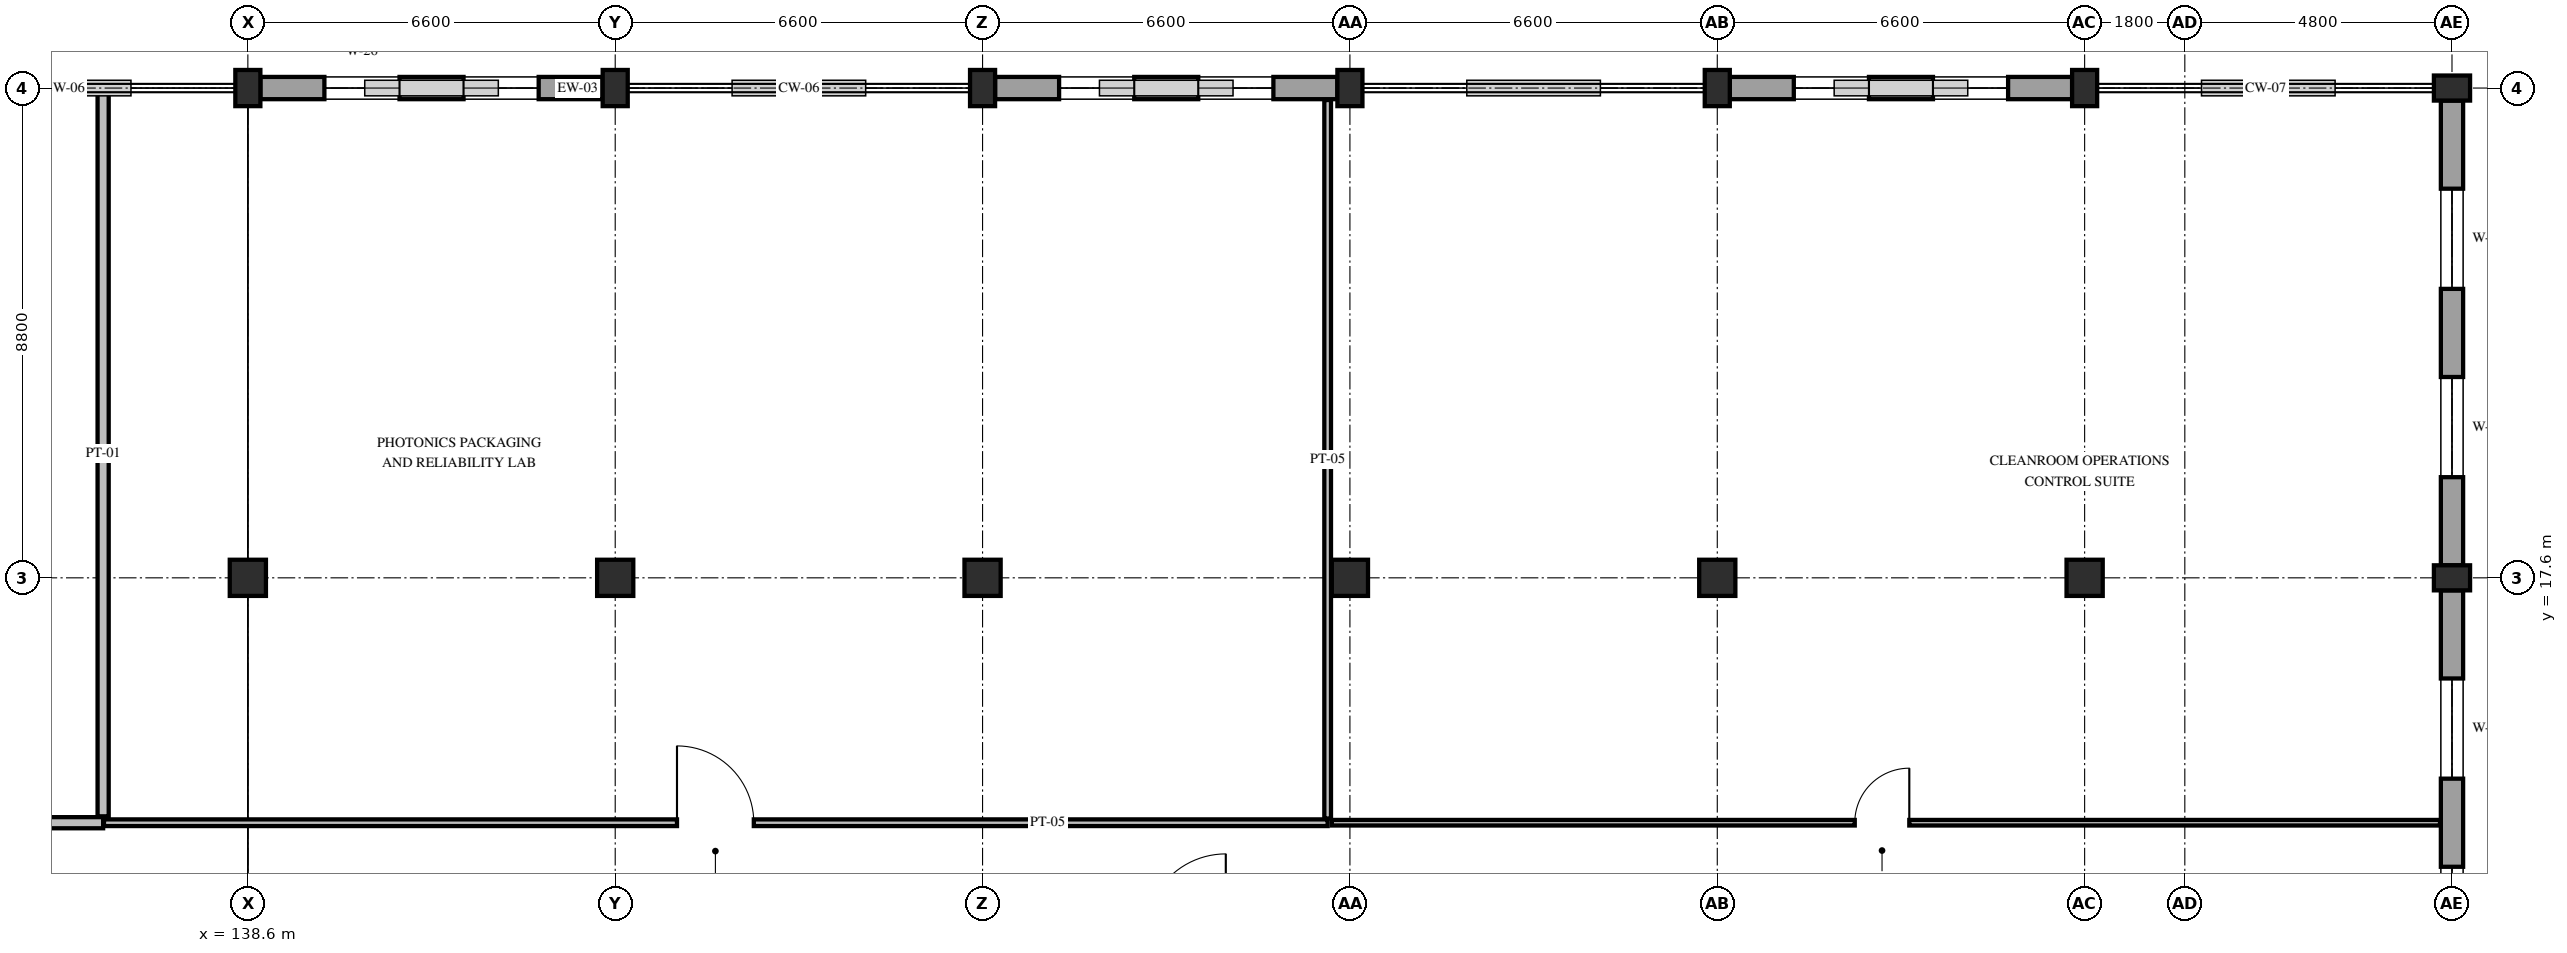
"""IFC4 building model, lengths in metres.
Left out: names, types, materials, properties, quantities, classifications, styles, units other than length and angle.
Written with IfcOpenShell. Run it as: python <this file> out.ifc"""

import sys

from ifc_helpers import new_model, si_unit, direction, frame, frame_2d, origin, origin_2d, place, context, subcontext, project, spatial, rectangle, extrude, element, fill, save


model = new_model("IFC4")
c1 = context("Model", 3, precision=1e-05, world=origin(), true_north=direction((0.0, 1.0)))
c2 = subcontext(c1, "Body", "Model", "MODEL_VIEW")
j1 = project(units=[si_unit("LENGTHUNIT", "METRE"), si_unit("PLANEANGLEUNIT", "RADIAN")], contexts=[c1])
p1 = place(None, origin())
s1 = spatial("IfcSite", under=j1, at=p1, CompositionType="ELEMENT")
p2 = place(p1, origin())
s2 = spatial("IfcBuilding", under=s1, at=p2, CompositionType="ELEMENT")
p3 = place(p2, frame((0.0, 0.0, 15.0)))
s3 = spatial("IfcBuildingStorey", under=s2, at=p3, CompositionType="ELEMENT", Elevation=15.0)
p4 = place(p3, frame((138.6, 17.6, 0.0), z_axis=(0.0, 0.0, 1.0), x_axis=(1.0, 0.0, 0.0)))
e1 = element("IfcColumn", 1, at=p4, inside=s3, PredefinedType="COLUMN", context=c2, shape_type="SweptSolid", body=[
    extrude(rectangle(XDim=0.65, YDim=0.65, at=origin_2d()), origin(), (0.0, 0.0, 1.0), 4.8),
])
p5 = place(p3, frame((138.6, 26.4, 0.0), z_axis=(0.0, 0.0, 1.0), x_axis=(1.0, 0.0, 0.0)))
e2 = element("IfcColumn", 2, at=p5, inside=s3, PredefinedType="PILASTER", context=c2, shape_type="SweptSolid", body=[
    extrude(rectangle(XDim=0.45, YDim=0.65, at=origin_2d()), origin(), (0.0, 0.0, 1.0), 4.8),
])
p6 = place(p3, frame((145.2, 17.6, 0.0), z_axis=(0.0, 0.0, 1.0), x_axis=(1.0, 0.0, 0.0)))
e3 = element("IfcColumn", 3, at=p6, inside=s3, PredefinedType="COLUMN", context=c2, shape_type="SweptSolid", body=[
    extrude(rectangle(XDim=0.65, YDim=0.65, at=origin_2d()), origin(), (0.0, 0.0, 1.0), 4.8),
])
p7 = place(p3, frame((145.2, 26.4, 0.0), z_axis=(0.0, 0.0, 1.0), x_axis=(1.0, 0.0, 0.0)))
e4 = element("IfcColumn", 4, at=p7, inside=s3, PredefinedType="PILASTER", context=c2, shape_type="SweptSolid", body=[
    extrude(rectangle(XDim=0.45, YDim=0.65, at=origin_2d()), origin(), (0.0, 0.0, 1.0), 4.8),
])
p8 = place(p3, frame((151.8, 17.6, 0.0), z_axis=(0.0, 0.0, 1.0), x_axis=(1.0, 0.0, 0.0)))
e5 = element("IfcColumn", 5, at=p8, inside=s3, PredefinedType="COLUMN", context=c2, shape_type="SweptSolid", body=[
    extrude(rectangle(XDim=0.65, YDim=0.65, at=origin_2d()), origin(), (0.0, 0.0, 1.0), 4.8),
])
p9 = place(p3, frame((151.8, 26.4, 0.0), z_axis=(0.0, 0.0, 1.0), x_axis=(1.0, 0.0, 0.0)))
e6 = element("IfcColumn", 6, at=p9, inside=s3, PredefinedType="PILASTER", context=c2, shape_type="SweptSolid", body=[
    extrude(rectangle(XDim=0.45, YDim=0.65, at=origin_2d()), origin(), (0.0, 0.0, 1.0), 4.8),
])
p10 = place(p3, frame((158.4, 17.6, 0.0), z_axis=(0.0, 0.0, 1.0), x_axis=(1.0, 0.0, 0.0)))
e7 = element("IfcColumn", 7, at=p10, inside=s3, PredefinedType="COLUMN", context=c2, shape_type="SweptSolid", body=[
    extrude(rectangle(XDim=0.65, YDim=0.65, at=origin_2d()), origin(), (0.0, 0.0, 1.0), 4.8),
])
p11 = place(p3, frame((158.4, 26.4, 0.0), z_axis=(0.0, 0.0, 1.0), x_axis=(1.0, 0.0, 0.0)))
e8 = element("IfcColumn", 8, at=p11, inside=s3, PredefinedType="PILASTER", context=c2, shape_type="SweptSolid", body=[
    extrude(rectangle(XDim=0.45, YDim=0.65, at=origin_2d()), origin(), (0.0, 0.0, 1.0), 4.8),
])
p12 = place(p3, frame((165.0, 17.6, 0.0), z_axis=(0.0, 0.0, 1.0), x_axis=(1.0, 0.0, 0.0)))
e9 = element("IfcColumn", 9, at=p12, inside=s3, PredefinedType="COLUMN", context=c2, shape_type="SweptSolid", body=[
    extrude(rectangle(XDim=0.65, YDim=0.65, at=origin_2d()), origin(), (0.0, 0.0, 1.0), 4.8),
])
p13 = place(p3, frame((165.0, 26.4, 0.0), z_axis=(0.0, 0.0, 1.0), x_axis=(1.0, 0.0, 0.0)))
e10 = element("IfcColumn", 10, at=p13, inside=s3, PredefinedType="PILASTER", context=c2, shape_type="SweptSolid", body=[
    extrude(rectangle(XDim=0.45, YDim=0.65, at=origin_2d()), origin(), (0.0, 0.0, 1.0), 4.8),
])
p14 = place(p3, frame((171.6, 17.6, 0.0), z_axis=(0.0, 0.0, 1.0), x_axis=(1.0, 0.0, 0.0)))
e11 = element("IfcColumn", 11, at=p14, inside=s3, PredefinedType="COLUMN", context=c2, shape_type="SweptSolid", body=[
    extrude(rectangle(XDim=0.65, YDim=0.65, at=origin_2d()), origin(), (0.0, 0.0, 1.0), 4.8),
])
for number, where, z_axis, x_axis in (
    (12, (171.6, 26.4, 0.0), (0.0, 0.0, 1.0), (1.0, 0.0, 0.0)),
    (13, (178.2, 17.6, 0.0), (0.0, 0.0, 1.0), (0.0, 1.0, 0.0)),
    (14, (178.2, 26.4, 0.0), (0.0, 0.0, 1.0), (0.0, 1.0, 0.0)),
):
    element("IfcColumn", number, at=place(p3, frame(where, z_axis=z_axis, x_axis=x_axis)), inside=s3, PredefinedType="PILASTER", context=c2, shape_type="SweptSolid", body=[
        extrude(rectangle(XDim=0.45, YDim=0.65, at=origin_2d()), origin(), (0.0, 0.0, 1.0), 4.8),
    ])
p15 = place(p3, frame((138.825, 26.4, 0.0), z_axis=(0.0, 0.0, 1.0), x_axis=(1.0, 0.0, 0.0)))
e15 = element("IfcWall", 15, at=p15, inside=s3, PredefinedType="STANDARD", context=c2, shape_type="SweptSolid", body=[
    extrude(rectangle(XDim=6.15, YDim=0.4, at=frame_2d((3.075, 0.0))), origin(), (0.0, 0.0, 1.0), 3.98),
])
p16 = place(p15, frame((1.15, 0.0, 0.85)))
e16 = element("IfcOpeningElement", 16, at=p16, cuts=e15, PredefinedType="OPENING", context=c2, shape_type="SweptSolid", body=[
    extrude(rectangle(XDim=1.35, YDim=1.88, at=frame_2d((0.675, 0.94))), frame((0.0, 0.215, 0.0), z_axis=(0.0, -1.0, 0.0), x_axis=(1.0, 0.0, 0.0)), (0.0, 0.0, 1.0), 0.43),
])
p17 = place(p15, frame((3.65, 0.0, 0.85)))
e17 = element("IfcOpeningElement", 17, at=p17, cuts=e15, PredefinedType="OPENING", context=c2, shape_type="SweptSolid", body=[
    extrude(rectangle(XDim=1.35, YDim=1.88, at=frame_2d((0.675, 0.94))), frame((0.0, 0.215, 0.0), z_axis=(0.0, -1.0, 0.0), x_axis=(1.0, 0.0, 0.0)), (0.0, 0.0, 1.0), 0.43),
])
p18 = place(p3, frame((152.025, 26.4, 0.0), z_axis=(0.0, 0.0, 1.0), x_axis=(1.0, 0.0, 0.0)))
e18 = element("IfcWall", 18, at=p18, inside=s3, PredefinedType="STANDARD", context=c2, shape_type="SweptSolid", body=[
    extrude(rectangle(XDim=6.15, YDim=0.4, at=frame_2d((3.075, 0.0))), origin(), (0.0, 0.0, 1.0), 3.98),
])
p19 = place(p18, frame((1.15, 0.0, 0.85)))
e19 = element("IfcOpeningElement", 19, at=p19, cuts=e18, PredefinedType="OPENING", context=c2, shape_type="SweptSolid", body=[
    extrude(rectangle(XDim=1.35, YDim=1.88, at=frame_2d((0.675, 0.94))), frame((0.0, 0.215, 0.0), z_axis=(0.0, -1.0, 0.0), x_axis=(1.0, 0.0, 0.0)), (0.0, 0.0, 1.0), 0.43),
])
p20 = place(p18, frame((3.65, 0.0, 0.85)))
e20 = element("IfcOpeningElement", 20, at=p20, cuts=e18, PredefinedType="OPENING", context=c2, shape_type="SweptSolid", body=[
    extrude(rectangle(XDim=1.35, YDim=1.88, at=frame_2d((0.675, 0.94))), frame((0.0, 0.215, 0.0), z_axis=(0.0, -1.0, 0.0), x_axis=(1.0, 0.0, 0.0)), (0.0, 0.0, 1.0), 0.43),
])
p21 = place(p3, frame((165.225, 26.4, 0.0), z_axis=(0.0, 0.0, 1.0), x_axis=(1.0, 0.0, 0.0)))
e21 = element("IfcWall", 21, at=p21, inside=s3, PredefinedType="STANDARD", context=c2, shape_type="SweptSolid", body=[
    extrude(rectangle(XDim=6.15, YDim=0.4, at=frame_2d((3.075, 0.0))), origin(), (0.0, 0.0, 1.0), 3.98),
])
p22 = place(p21, frame((1.15, 0.0, 0.85)))
e22 = element("IfcOpeningElement", 22, at=p22, cuts=e21, PredefinedType="OPENING", context=c2, shape_type="SweptSolid", body=[
    extrude(rectangle(XDim=1.35, YDim=1.88, at=frame_2d((0.675, 0.94))), frame((0.0, 0.215, 0.0), z_axis=(0.0, -1.0, 0.0), x_axis=(1.0, 0.0, 0.0)), (0.0, 0.0, 1.0), 0.43),
])
p23 = place(p21, frame((3.65, 0.0, 0.85)))
e23 = element("IfcOpeningElement", 23, at=p23, cuts=e21, PredefinedType="OPENING", context=c2, shape_type="SweptSolid", body=[
    extrude(rectangle(XDim=1.35, YDim=1.88, at=frame_2d((0.675, 0.94))), frame((0.0, 0.215, 0.0), z_axis=(0.0, -1.0, 0.0), x_axis=(1.0, 0.0, 0.0)), (0.0, 0.0, 1.0), 0.43),
])
p24 = place(p3, frame((178.2, 26.175, 0.0), z_axis=(0.0, 0.0, 1.0), x_axis=(0.0, -1.0, 0.0)))
e24 = element("IfcWall", 24, at=p24, inside=s3, PredefinedType="STANDARD", context=c2, shape_type="SweptSolid", body=[
    extrude(rectangle(XDim=8.35, YDim=0.4, at=frame_2d((4.175, 0.0))), origin(), (0.0, 0.0, 1.0), 3.98),
])
p25 = place(p24, frame((1.583, 0.0, 0.85)))
e25 = element("IfcOpeningElement", 25, at=p25, cuts=e24, PredefinedType="OPENING", context=c2, shape_type="SweptSolid", body=[
    extrude(rectangle(XDim=1.8, YDim=2.04, at=frame_2d((0.9, 1.02))), frame((0.0, 0.215, 0.0), z_axis=(0.0, -1.0, 0.0), x_axis=(1.0, 0.0, 0.0)), (0.0, 0.0, 1.0), 0.43),
])
p26 = place(p24, frame((4.967, 0.0, 0.85)))
e26 = element("IfcOpeningElement", 26, at=p26, cuts=e24, PredefinedType="OPENING", context=c2, shape_type="SweptSolid", body=[
    extrude(rectangle(XDim=1.8, YDim=2.04, at=frame_2d((0.9, 1.02))), frame((0.0, 0.215, 0.0), z_axis=(0.0, -1.0, 0.0), x_axis=(1.0, 0.0, 0.0)), (0.0, 0.0, 1.0), 0.43),
])
p27 = place(p3, frame((178.2, 17.375, 0.0), z_axis=(0.0, 0.0, 1.0), x_axis=(0.0, -1.0, 0.0)))
e27 = element("IfcWall", 27, at=p27, inside=s3, PredefinedType="STANDARD", context=c2, shape_type="SweptSolid", body=[
    extrude(rectangle(XDim=8.35, YDim=0.4, at=frame_2d((4.175, 0.0))), origin(), (0.0, 0.0, 1.0), 3.98),
])
p28 = place(p27, frame((1.583, 0.0, 0.85)))
e28 = element("IfcOpeningElement", 28, at=p28, cuts=e27, PredefinedType="OPENING", context=c2, shape_type="SweptSolid", body=[
    extrude(rectangle(XDim=1.8, YDim=2.04, at=frame_2d((0.9, 1.02))), frame((0.0, 0.215, 0.0), z_axis=(0.0, -1.0, 0.0), x_axis=(1.0, 0.0, 0.0)), (0.0, 0.0, 1.0), 0.43),
])
p29 = place(p27, frame((4.967, 0.0, 0.85)))
e29 = element("IfcOpeningElement", 29, at=p29, cuts=e27, PredefinedType="OPENING", context=c2, shape_type="SweptSolid", body=[
    extrude(rectangle(XDim=1.8, YDim=2.04, at=frame_2d((0.9, 1.02))), frame((0.0, 0.215, 0.0), z_axis=(0.0, -1.0, 0.0), x_axis=(1.0, 0.0, 0.0)), (0.0, 0.0, 1.0), 0.43),
])
p30 = place(p3, frame((99.24, 13.2, 0.0), z_axis=(0.0, 0.0, 1.0), x_axis=(1.0, 0.0, 0.0)))
e30 = element("IfcWall", 30, at=p30, inside=s3, PredefinedType="PARTITIONING", context=c2, shape_type="SweptSolid", body=[
    extrude(rectangle(XDim=36.76, YDim=0.2, at=frame_2d((18.38, 0.0))), origin(), (0.0, 0.0, 1.0), 4.065),
])
p31 = place(p30, frame((20.23, 0.0, 0.0)))
e31 = element("IfcOpeningElement", 31, at=p31, cuts=e30, PredefinedType="OPENING", context=c2, shape_type="SweptSolid", body=[
    extrude(rectangle(XDim=1.76, YDim=2.35, at=frame_2d((0.88, 1.175))), frame((0.0, 0.115, 0.0), z_axis=(0.0, -1.0, 0.0), x_axis=(1.0, 0.0, 0.0)), (0.0, 0.0, 1.0), 0.23),
])
p32 = place(p3, frame((136.0, 13.315, 0.0), z_axis=(0.0, 0.0, 1.0), x_axis=(0.0, 1.0, 0.0)))
e32 = element("IfcWall", 32, at=p32, inside=s3, PredefinedType="PARTITIONING", context=c2, shape_type="SweptSolid", body=[
    extrude(rectangle(XDim=13.045, YDim=0.2, at=frame_2d((6.522, 0.0))), origin(), (0.0, 0.0, 1.0), 3.98),
])
p33 = place(p3, frame((136.015, 13.2, 0.0), z_axis=(0.0, 0.0, 1.0), x_axis=(1.0, 0.0, 0.0)))
e33 = element("IfcWall", 33, at=p33, inside=s3, PredefinedType="PARTITIONING", context=c2, shape_type="SweptSolid", body=[
    extrude(rectangle(XDim=21.985, YDim=0.12, at=frame_2d((10.993, 0.0))), origin(), (0.0, 0.0, 1.0), 4.065),
])
p34 = place(p33, frame((10.295, 0.0, 0.0)))
e34 = element("IfcOpeningElement", 34, at=p34, cuts=e33, PredefinedType="OPENING", context=c2, shape_type="SweptSolid", body=[
    extrude(rectangle(XDim=1.38, YDim=2.25, at=frame_2d((0.69, 1.125))), frame((0.0, 0.075, 0.0), z_axis=(0.0, -1.0, 0.0), x_axis=(1.0, 0.0, 0.0)), (0.0, 0.0, 1.0), 0.15),
])
p35 = place(p3, frame((158.0, 13.275, 0.0), z_axis=(0.0, 0.0, 1.0), x_axis=(0.0, 1.0, 0.0)))
e35 = element("IfcWall", 35, at=p35, inside=s3, PredefinedType="PARTITIONING", context=c2, shape_type="SweptSolid", body=[
    extrude(rectangle(XDim=12.91, YDim=0.12, at=frame_2d((6.455, 0.0))), origin(), (0.0, 0.0, 1.0), 3.98),
])
p36 = place(p3, frame((158.075, 13.2, 0.0), z_axis=(0.0, 0.0, 1.0), x_axis=(1.0, 0.0, 0.0)))
e36 = element("IfcWall", 36, at=p36, inside=s3, PredefinedType="PARTITIONING", context=c2, shape_type="SweptSolid", body=[
    extrude(rectangle(XDim=19.91, YDim=0.1, at=frame_2d((9.955, 0.0))), origin(), (0.0, 0.0, 1.0), 3.98),
])
p37 = place(p36, frame((9.395, 0.0, 0.0)))
e37 = element("IfcOpeningElement", 37, at=p37, cuts=e36, PredefinedType="OPENING", context=c2, shape_type="SweptSolid", body=[
    extrude(rectangle(XDim=0.98, YDim=2.2, at=frame_2d((0.49, 1.1))), frame((0.0, 0.065, 0.0), z_axis=(0.0, -1.0, 0.0), x_axis=(1.0, 0.0, 0.0)), (0.0, 0.0, 1.0), 0.13),
])
p38 = place(p16, origin())
e38 = element("IfcWindow", 38, at=p38, inside=s3, PartitioningType="SINGLE_PANEL", PredefinedType="WINDOW", context=c2, shape_type="SweptSolid", body=[
    extrude(rectangle(XDim=1.35, YDim=1.88, at=frame_2d((0.675, 0.94))), frame((0.0, 0.03, 0.0), z_axis=(0.0, -1.0, 0.0), x_axis=(1.0, 0.0, 0.0)), (0.0, 0.0, 1.0), 0.06),
])
fill(e16, e38)
p39 = place(p17, origin())
e39 = element("IfcWindow", 39, at=p39, inside=s3, PartitioningType="SINGLE_PANEL", PredefinedType="WINDOW", context=c2, shape_type="SweptSolid", body=[
    extrude(rectangle(XDim=1.35, YDim=1.88, at=frame_2d((0.675, 0.94))), frame((0.0, 0.03, 0.0), z_axis=(0.0, -1.0, 0.0), x_axis=(1.0, 0.0, 0.0)), (0.0, 0.0, 1.0), 0.06),
])
fill(e17, e39)
p40 = place(p19, origin())
e40 = element("IfcWindow", 40, at=p40, inside=s3, PartitioningType="SINGLE_PANEL", PredefinedType="WINDOW", context=c2, shape_type="SweptSolid", body=[
    extrude(rectangle(XDim=1.35, YDim=1.88, at=frame_2d((0.675, 0.94))), frame((0.0, 0.03, 0.0), z_axis=(0.0, -1.0, 0.0), x_axis=(1.0, 0.0, 0.0)), (0.0, 0.0, 1.0), 0.06),
])
fill(e19, e40)
p41 = place(p20, origin())
e41 = element("IfcWindow", 41, at=p41, inside=s3, PartitioningType="SINGLE_PANEL", PredefinedType="WINDOW", context=c2, shape_type="SweptSolid", body=[
    extrude(rectangle(XDim=1.35, YDim=1.88, at=frame_2d((0.675, 0.94))), frame((0.0, 0.03, 0.0), z_axis=(0.0, -1.0, 0.0), x_axis=(1.0, 0.0, 0.0)), (0.0, 0.0, 1.0), 0.06),
])
fill(e20, e41)
p42 = place(p22, origin())
e42 = element("IfcWindow", 42, at=p42, inside=s3, PartitioningType="SINGLE_PANEL", PredefinedType="WINDOW", context=c2, shape_type="SweptSolid", body=[
    extrude(rectangle(XDim=1.35, YDim=1.88, at=frame_2d((0.675, 0.94))), frame((0.0, 0.03, 0.0), z_axis=(0.0, -1.0, 0.0), x_axis=(1.0, 0.0, 0.0)), (0.0, 0.0, 1.0), 0.06),
])
fill(e22, e42)
p43 = place(p23, origin())
e43 = element("IfcWindow", 43, at=p43, inside=s3, PartitioningType="SINGLE_PANEL", PredefinedType="WINDOW", context=c2, shape_type="SweptSolid", body=[
    extrude(rectangle(XDim=1.35, YDim=1.88, at=frame_2d((0.675, 0.94))), frame((0.0, 0.03, 0.0), z_axis=(0.0, -1.0, 0.0), x_axis=(1.0, 0.0, 0.0)), (0.0, 0.0, 1.0), 0.06),
])
fill(e23, e43)
p44 = place(p25, origin())
e44 = element("IfcWindow", 44, at=p44, inside=s3, PartitioningType="DOUBLE_PANEL_VERTICAL", PredefinedType="WINDOW", context=c2, shape_type="SweptSolid", body=[
    extrude(rectangle(XDim=1.8, YDim=2.04, at=frame_2d((0.9, 1.02))), frame((0.0, 0.03, 0.0), z_axis=(0.0, -1.0, 0.0), x_axis=(1.0, 0.0, 0.0)), (0.0, 0.0, 1.0), 0.06),
])
fill(e25, e44)
p45 = place(p26, origin())
e45 = element("IfcWindow", 45, at=p45, inside=s3, PartitioningType="DOUBLE_PANEL_VERTICAL", PredefinedType="WINDOW", context=c2, shape_type="SweptSolid", body=[
    extrude(rectangle(XDim=1.8, YDim=2.04, at=frame_2d((0.9, 1.02))), frame((0.0, 0.03, 0.0), z_axis=(0.0, -1.0, 0.0), x_axis=(1.0, 0.0, 0.0)), (0.0, 0.0, 1.0), 0.06),
])
fill(e26, e45)
p46 = place(p28, origin())
e46 = element("IfcWindow", 46, at=p46, inside=s3, PartitioningType="DOUBLE_PANEL_VERTICAL", PredefinedType="WINDOW", context=c2, shape_type="SweptSolid", body=[
    extrude(rectangle(XDim=1.8, YDim=2.04, at=frame_2d((0.9, 1.02))), frame((0.0, 0.03, 0.0), z_axis=(0.0, -1.0, 0.0), x_axis=(1.0, 0.0, 0.0)), (0.0, 0.0, 1.0), 0.06),
])
fill(e28, e46)
p47 = place(p29, origin())
e47 = element("IfcWindow", 47, at=p47, inside=s3, PartitioningType="DOUBLE_PANEL_VERTICAL", PredefinedType="WINDOW", context=c2, shape_type="SweptSolid", body=[
    extrude(rectangle(XDim=1.8, YDim=2.04, at=frame_2d((0.9, 1.02))), frame((0.0, 0.03, 0.0), z_axis=(0.0, -1.0, 0.0), x_axis=(1.0, 0.0, 0.0)), (0.0, 0.0, 1.0), 0.06),
])
fill(e29, e47)
p48 = place(p34, origin())
e48 = element("IfcDoor", 48, at=p48, inside=s3, OperationType="SINGLE_SWING_LEFT", PredefinedType="DOOR", context=c2, shape_type="SweptSolid", body=[
    extrude(rectangle(XDim=1.38, YDim=2.25, at=frame_2d((0.69, 1.125))), frame((0.0, 0.025, 0.0), z_axis=(0.0, -1.0, 0.0), x_axis=(1.0, 0.0, 0.0)), (0.0, 0.0, 1.0), 0.05),
])
fill(e34, e48)
p49 = place(p37, origin())
e49 = element("IfcDoor", 49, at=p49, inside=s3, OperationType="SINGLE_SWING_RIGHT", PredefinedType="DOOR", context=c2, shape_type="SweptSolid", body=[
    extrude(rectangle(XDim=0.98, YDim=2.2, at=frame_2d((0.49, 1.1))), frame((0.0, 0.025, 0.0), z_axis=(0.0, -1.0, 0.0), x_axis=(1.0, 0.0, 0.0)), (0.0, 0.0, 1.0), 0.05),
])
fill(e37, e49)
save(model, sys.argv[1])
